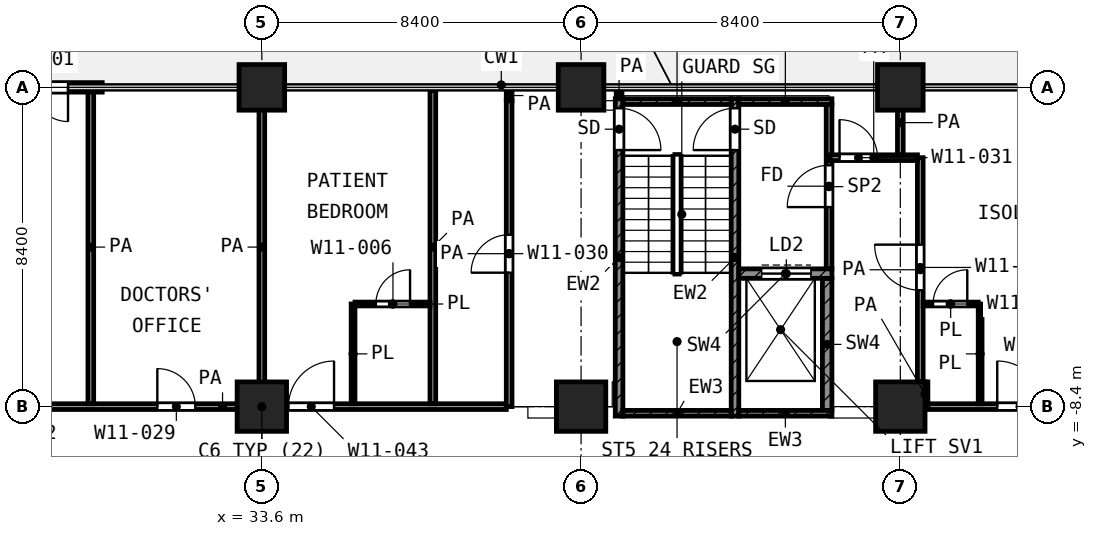
"""IFC4 building model, lengths in metres.
Left out: names, types, materials, properties, quantities, classifications, styles, units other than length and angle.
Written with IfcOpenShell. Run it as: python <this file> out.ifc"""

import sys

from ifc_helpers import new_model, si_unit, direction, frame, frame_2d, origin, origin_2d, place, context, subcontext, project, spatial, rectangle, extrude, element, fill, save


model = new_model("IFC4")
c1 = context("Model", 3, precision=1e-05, world=origin(), true_north=direction((0.0, 1.0)))
c2 = subcontext(c1, "Body", "Model", "MODEL_VIEW")
j1 = project(units=[si_unit("LENGTHUNIT", "METRE"), si_unit("PLANEANGLEUNIT", "RADIAN")], contexts=[c1])
p1 = place(None, origin())
s1 = spatial("IfcSite", under=j1, at=p1, CompositionType="ELEMENT")
p2 = place(p1, origin())
s2 = spatial("IfcBuilding", under=s1, at=p2, CompositionType="ELEMENT")
p3 = place(p2, frame((0.0, 0.0, 72.8)))
s3 = spatial("IfcBuildingStorey", under=s2, at=p3, CompositionType="ELEMENT", Elevation=72.8)
for number, where, z_axis, x_axis in (
    (1, (33.6, 0.0, 0.0), (0.0, 0.0, 1.0), (1.0, 0.0, 0.0)),
    (2, (42.0, 0.0, 0.0), (0.0, 0.0, 1.0), (1.0, 0.0, 0.0)),
    (3, (50.4, 0.0, 0.0), (0.0, 0.0, 1.0), (1.0, 0.0, 0.0)),
):
    element("IfcColumn", number, at=place(p3, frame(where, z_axis=z_axis, x_axis=x_axis)), inside=s3, PredefinedType="COLUMN", context=c2, shape_type="SweptSolid", body=[
        extrude(rectangle(XDim=1.2, YDim=1.2, at=origin_2d()), origin(), (0.0, 0.0, 1.0), 4.2),
    ])
for number, where, z_axis, x_axis in (
    (4, (33.6, -8.4, 0.0), (0.0, 0.0, 1.0), (1.0, 0.0, 0.0)),
    (5, (42.0, -8.4, 0.0), (0.0, 0.0, 1.0), (1.0, 0.0, 0.0)),
    (6, (50.4, -8.4, 0.0), (0.0, 0.0, 1.0), (1.0, 0.0, 0.0)),
):
    element("IfcColumn", number, at=place(p3, frame(where, z_axis=z_axis, x_axis=x_axis)), inside=s3, PredefinedType="COLUMN", context=c2, shape_type="SweptSolid", body=[
        extrude(rectangle(XDim=1.3, YDim=1.3, at=origin_2d()), origin(), (0.0, 0.0, 1.0), 4.2),
    ])
p4 = place(p3, frame((29.4, 0.0, 0.0), z_axis=(0.0, 0.0, 1.0), x_axis=(-1.0, 0.0, 0.0)))
e7 = element("IfcWall", 7, at=p4, inside=s3, PredefinedType="SOLIDWALL", context=c2, shape_type="SweptSolid", body=[
    extrude(rectangle(XDim=3.6, YDim=0.25, at=frame_2d((1.8, 0.0))), origin(), (0.0, 0.0, 1.0), 3.78),
])
p5 = place(p4, frame((0.9, 0.0, 0.0)))
e8 = element("IfcOpeningElement", 8, at=p5, cuts=e7, PredefinedType="OPENING", context=c2, shape_type="SweptSolid", body=[
    extrude(rectangle(XDim=1.8, YDim=2.1, at=frame_2d((0.9, 1.05))), frame((0.0, 0.135, 0.0), z_axis=(0.0, -1.0, 0.0), x_axis=(1.0, 0.0, 0.0)), (0.0, 0.0, 1.0), 0.27),
])
p6 = place(p3, frame((43.0, -8.65, 0.0), z_axis=(0.0, 0.0, 1.0), x_axis=(0.0, 1.0, 0.0)))
e9 = element("IfcWall", 9, at=p6, inside=s3, PredefinedType="SHEAR", context=c2, shape_type="SweptSolid", body=[
    extrude(rectangle(XDim=8.35, YDim=0.2, at=frame_2d((4.175, 0.0))), origin(), (0.0, 0.0, 1.0), 3.9),
])
p7 = place(p6, frame((7.0, 0.0, 0.0)))
e10 = element("IfcOpeningElement", 10, at=p7, cuts=e9, PredefinedType="OPENING", context=c2, shape_type="SweptSolid", body=[
    extrude(rectangle(XDim=1.1, YDim=2.1, at=frame_2d((0.55, 1.05))), frame((0.0, 0.11, 0.0), z_axis=(0.0, -1.0, 0.0), x_axis=(1.0, 0.0, 0.0)), (0.0, 0.0, 1.0), 0.22),
])
p8 = place(p3, frame((46.05, -8.65, 0.0), z_axis=(0.0, 0.0, 1.0), x_axis=(0.0, 1.0, 0.0)))
e11 = element("IfcWall", 11, at=p8, inside=s3, PredefinedType="SHEAR", context=c2, shape_type="SweptSolid", body=[
    extrude(rectangle(XDim=8.35, YDim=0.2, at=frame_2d((4.175, 0.0))), origin(), (0.0, 0.0, 1.0), 3.9),
])
p9 = place(p8, frame((7.0, 0.0, 0.0)))
e12 = element("IfcOpeningElement", 12, at=p9, cuts=e11, PredefinedType="OPENING", context=c2, shape_type="SweptSolid", body=[
    extrude(rectangle(XDim=1.1, YDim=2.1, at=frame_2d((0.55, 1.05))), frame((0.0, 0.11, 0.0), z_axis=(0.0, -1.0, 0.0), x_axis=(1.0, 0.0, 0.0)), (0.0, 0.0, 1.0), 0.22),
])
p10 = place(p3, frame((43.1, -0.375, 0.0), z_axis=(0.0, 0.0, 1.0), x_axis=(1.0, 0.0, 0.0)))
e13 = element("IfcWall", 13, at=p10, inside=s3, PredefinedType="SHEAR", context=c2, shape_type="SweptSolid", body=[
    extrude(rectangle(XDim=2.85, YDim=0.15, at=frame_2d((1.425, 0.0))), origin(), (0.0, 0.0, 1.0), 3.9),
])
p11 = place(p3, frame((46.15, -0.375, 0.0), z_axis=(0.0, 0.0, 1.0), x_axis=(1.0, 0.0, 0.0)))
e14 = element("IfcWall", 14, at=p11, inside=s3, PredefinedType="SHEAR", context=c2, shape_type="SweptSolid", body=[
    extrude(rectangle(XDim=2.45, YDim=0.15, at=frame_2d((1.225, 0.0))), origin(), (0.0, 0.0, 1.0), 3.9),
])
p12 = place(p3, frame((43.1, -8.575, 0.0), z_axis=(0.0, 0.0, 1.0), x_axis=(1.0, 0.0, 0.0)))
e15 = element("IfcWall", 15, at=p12, inside=s3, PredefinedType="SHEAR", context=c2, shape_type="SweptSolid", body=[
    extrude(rectangle(XDim=2.85, YDim=0.15, at=frame_2d((1.425, 0.0))), origin(), (0.0, 0.0, 1.0), 3.9),
])
p13 = place(p3, frame((46.15, -8.575, 0.0), z_axis=(0.0, 0.0, 1.0), x_axis=(1.0, 0.0, 0.0)))
e16 = element("IfcWall", 16, at=p13, inside=s3, PredefinedType="SHEAR", context=c2, shape_type="SweptSolid", body=[
    extrude(rectangle(XDim=2.45, YDim=0.15, at=frame_2d((1.225, 0.0))), origin(), (0.0, 0.0, 1.0), 3.9),
])
p14 = place(p3, frame((46.15, -4.9, 0.0), z_axis=(0.0, 0.0, 1.0), x_axis=(1.0, 0.0, 0.0)))
e17 = element("IfcWall", 17, at=p14, inside=s3, PredefinedType="SHEAR", context=c2, shape_type="SweptSolid", body=[
    extrude(rectangle(XDim=2.45, YDim=0.25, at=frame_2d((1.225, 0.0))), origin(), (0.0, 0.0, 1.0), 3.9),
])
p15 = place(p14, frame((0.6, 0.0, 0.0)))
e18 = element("IfcOpeningElement", 18, at=p15, cuts=e17, PredefinedType="OPENING", context=c2, shape_type="SweptSolid", body=[
    extrude(rectangle(XDim=1.3, YDim=2.1, at=frame_2d((0.65, 1.05))), frame((0.0, 0.135, 0.0), z_axis=(0.0, -1.0, 0.0), x_axis=(1.0, 0.0, 0.0)), (0.0, 0.0, 1.0), 0.27),
])
p16 = place(p3, frame((48.475, -8.5, 0.0), z_axis=(0.0, 0.0, 1.0), x_axis=(0.0, 1.0, 0.0)))
e19 = element("IfcWall", 19, at=p16, inside=s3, PredefinedType="SHEAR", context=c2, shape_type="SweptSolid", body=[
    extrude(rectangle(XDim=3.475, YDim=0.25, at=frame_2d((1.738, 0.0))), origin(), (0.0, 0.0, 1.0), 3.9),
])
p17 = place(p3, frame((48.525, -4.775, 0.0), z_axis=(0.0, 0.0, 1.0), x_axis=(0.0, 1.0, 0.0)))
e20 = element("IfcWall", 20, at=p17, inside=s3, PredefinedType="PARTITIONING", context=c2, shape_type="SweptSolid", body=[
    extrude(rectangle(XDim=4.325, YDim=0.15, at=frame_2d((2.163, 0.0))), origin(), (0.0, 0.0, 1.0), 3.9),
])
p18 = place(p17, frame((1.625, 0.0, 0.0)))
e21 = element("IfcOpeningElement", 21, at=p18, cuts=e20, PredefinedType="OPENING", context=c2, shape_type="SweptSolid", body=[
    extrude(rectangle(XDim=1.1, YDim=2.1, at=frame_2d((0.55, 1.05))), frame((0.0, 0.085, 0.0), z_axis=(0.0, -1.0, 0.0), x_axis=(1.0, 0.0, 0.0)), (0.0, 0.0, 1.0), 0.17),
])
p19 = place(p3, frame((36.05, -5.7, 0.0), z_axis=(0.0, 0.0, 1.0), x_axis=(1.0, 0.0, 0.0)))
e22 = element("IfcWall", 22, at=p19, inside=s3, PredefinedType="PARTITIONING", context=c2, shape_type="SweptSolid", body=[
    extrude(rectangle(XDim=1.975, YDim=0.1, at=frame_2d((0.987, 0.0))), origin(), (0.0, 0.0, 1.0), 3.9),
])
p20 = place(p19, frame((0.55, 0.0, 0.0)))
e23 = element("IfcOpeningElement", 23, at=p20, cuts=e22, PredefinedType="OPENING", context=c2, shape_type="SweptSolid", body=[
    extrude(rectangle(XDim=0.9, YDim=2.1, at=frame_2d((0.45, 1.05))), frame((0.0, 0.06, 0.0), z_axis=(0.0, -1.0, 0.0), x_axis=(1.0, 0.0, 0.0)), (0.0, 0.0, 1.0), 0.12),
])
p21 = place(p3, frame((51.0, -5.7, 0.0), z_axis=(0.0, 0.0, 1.0), x_axis=(1.0, 0.0, 0.0)))
e24 = element("IfcWall", 24, at=p21, inside=s3, PredefinedType="PARTITIONING", context=c2, shape_type="SweptSolid", body=[
    extrude(rectangle(XDim=1.45, YDim=0.1, at=frame_2d((0.725, 0.0))), origin(), (0.0, 0.0, 1.0), 3.9),
])
p22 = place(p21, frame((0.262, 0.0, 0.0)))
e25 = element("IfcOpeningElement", 25, at=p22, cuts=e24, PredefinedType="OPENING", context=c2, shape_type="SweptSolid", body=[
    extrude(rectangle(XDim=0.9, YDim=2.1, at=frame_2d((0.45, 1.05))), frame((0.0, 0.06, 0.0), z_axis=(0.0, -1.0, 0.0), x_axis=(1.0, 0.0, 0.0)), (0.0, 0.0, 1.0), 0.12),
])
for number, where, z_axis, x_axis in (
    (26, (36.0, -8.325, 0.0), (0.0, 0.0, 1.0), (0.0, 1.0, 0.0)),
    (27, (52.5, -8.325, 0.0), (0.0, 0.0, 1.0), (0.0, 1.0, 0.0)),
):
    element("IfcWall", number, at=place(p3, frame(where, z_axis=z_axis, x_axis=x_axis)), inside=s3, PredefinedType="PARTITIONING", context=c2, shape_type="SweptSolid", body=[
        extrude(rectangle(XDim=2.625, YDim=0.1, at=frame_2d((1.312, 0.0))), origin(), (0.0, 0.0, 1.0), 3.9),
    ])
p23 = place(p3, frame((25.1, -8.4, 0.0), z_axis=(0.0, 0.0, 1.0), x_axis=(1.0, 0.0, 0.0)))
e28 = element("IfcWall", 28, at=p23, inside=s3, PredefinedType="PARTITIONING", context=c2, shape_type="SweptSolid", body=[
    extrude(rectangle(XDim=14.932, YDim=0.15, at=frame_2d((7.466, 0.0))), origin(), (0.0, 0.0, 1.0), 3.9),
])
p24 = place(p23, frame((1.45, 0.0, 0.0)))
e29 = element("IfcOpeningElement", 29, at=p24, cuts=e28, PredefinedType="OPENING", context=c2, shape_type="SweptSolid", body=[
    extrude(rectangle(XDim=1.2, YDim=2.1, at=frame_2d((0.6, 1.05))), frame((0.0, 0.085, 0.0), z_axis=(0.0, -1.0, 0.0), x_axis=(1.0, 0.0, 0.0)), (0.0, 0.0, 1.0), 0.17),
])
p25 = place(p23, frame((5.75, 0.0, 0.0)))
e30 = element("IfcOpeningElement", 30, at=p25, cuts=e28, PredefinedType="OPENING", context=c2, shape_type="SweptSolid", body=[
    extrude(rectangle(XDim=1.0, YDim=2.1, at=frame_2d((0.5, 1.05))), frame((0.0, 0.085, 0.0), z_axis=(0.0, -1.0, 0.0), x_axis=(1.0, 0.0, 0.0)), (0.0, 0.0, 1.0), 0.17),
])
p26 = place(p23, frame((9.2, 0.0, 0.0)))
e31 = element("IfcOpeningElement", 31, at=p26, cuts=e28, PredefinedType="OPENING", context=c2, shape_type="SweptSolid", body=[
    extrude(rectangle(XDim=1.2, YDim=2.1, at=frame_2d((0.6, 1.05))), frame((0.0, 0.085, 0.0), z_axis=(0.0, -1.0, 0.0), x_axis=(1.0, 0.0, 0.0)), (0.0, 0.0, 1.0), 0.17),
])
p27 = place(p3, frame((51.125, -8.4, 0.0), z_axis=(0.0, 0.0, 1.0), x_axis=(1.0, 0.0, 0.0)))
e32 = element("IfcWall", 32, at=p27, inside=s3, PredefinedType="PARTITIONING", context=c2, shape_type="SweptSolid", body=[
    extrude(rectangle(XDim=28.595, YDim=0.15, at=frame_2d((14.297, 0.0))), origin(), (0.0, 0.0, 1.0), 3.9),
])
p28 = place(p27, frame((1.825, 0.0, 0.0)))
e33 = element("IfcOpeningElement", 33, at=p28, cuts=e32, PredefinedType="OPENING", context=c2, shape_type="SweptSolid", body=[
    extrude(rectangle(XDim=1.2, YDim=2.1, at=frame_2d((0.6, 1.05))), frame((0.0, 0.085, 0.0), z_axis=(0.0, -1.0, 0.0), x_axis=(1.0, 0.0, 0.0)), (0.0, 0.0, 1.0), 0.17),
])
p29 = place(p27, frame((3.375, 0.0, 0.0)))
e34 = element("IfcOpeningElement", 34, at=p29, cuts=e32, PredefinedType="OPENING", context=c2, shape_type="SweptSolid", body=[
    extrude(rectangle(XDim=1.2, YDim=2.1, at=frame_2d((0.6, 1.05))), frame((0.0, 0.085, 0.0), z_axis=(0.0, -1.0, 0.0), x_axis=(1.0, 0.0, 0.0)), (0.0, 0.0, 1.0), 0.17),
])
p30 = place(p27, frame((5.775, 0.0, 0.0)))
e35 = element("IfcOpeningElement", 35, at=p30, cuts=e32, PredefinedType="OPENING", context=c2, shape_type="SweptSolid", body=[
    extrude(rectangle(XDim=1.2, YDim=2.1, at=frame_2d((0.6, 1.05))), frame((0.0, 0.085, 0.0), z_axis=(0.0, -1.0, 0.0), x_axis=(1.0, 0.0, 0.0)), (0.0, 0.0, 1.0), 0.17),
])
p31 = place(p27, frame((8.375, 0.0, 0.0)))
e36 = element("IfcOpeningElement", 36, at=p31, cuts=e32, PredefinedType="OPENING", context=c2, shape_type="SweptSolid", body=[
    extrude(rectangle(XDim=1.2, YDim=2.1, at=frame_2d((0.6, 1.05))), frame((0.0, 0.085, 0.0), z_axis=(0.0, -1.0, 0.0), x_axis=(1.0, 0.0, 0.0)), (0.0, 0.0, 1.0), 0.17),
])
p32 = place(p27, frame((13.675, 0.0, 0.0)))
e37 = element("IfcOpeningElement", 37, at=p32, cuts=e32, PredefinedType="OPENING", context=c2, shape_type="SweptSolid", body=[
    extrude(rectangle(XDim=1.2, YDim=2.1, at=frame_2d((0.6, 1.05))), frame((0.0, 0.085, 0.0), z_axis=(0.0, -1.0, 0.0), x_axis=(1.0, 0.0, 0.0)), (0.0, 0.0, 1.0), 0.17),
])
p33 = place(p27, frame((16.775, 0.0, 0.0)))
e38 = element("IfcOpeningElement", 38, at=p33, cuts=e32, PredefinedType="OPENING", context=c2, shape_type="SweptSolid", body=[
    extrude(rectangle(XDim=0.9, YDim=2.1, at=frame_2d((0.45, 1.05))), frame((0.0, 0.085, 0.0), z_axis=(0.0, -1.0, 0.0), x_axis=(1.0, 0.0, 0.0)), (0.0, 0.0, 1.0), 0.17),
])
p34 = place(p27, frame((22.275, 0.0, 0.0)))
e39 = element("IfcOpeningElement", 39, at=p34, cuts=e32, PredefinedType="OPENING", context=c2, shape_type="SweptSolid", body=[
    extrude(rectangle(XDim=1.5, YDim=2.1, at=frame_2d((0.75, 1.05))), frame((0.0, 0.085, 0.0), z_axis=(0.0, -1.0, 0.0), x_axis=(1.0, 0.0, 0.0)), (0.0, 0.0, 1.0), 0.17),
])
p35 = place(p3, frame((48.55, -1.85, 0.0), z_axis=(0.0, 0.0, 1.0), x_axis=(1.0, 0.0, 0.0)))
e40 = element("IfcWall", 40, at=p35, inside=s3, PredefinedType="PARTITIONING", context=c2, shape_type="SweptSolid", body=[
    extrude(rectangle(XDim=2.3, YDim=0.15, at=frame_2d((1.15, 0.0))), origin(), (0.0, 0.0, 1.0), 3.9),
])
p36 = place(p35, frame((0.25, 0.0, 0.0)))
e41 = element("IfcOpeningElement", 41, at=p36, cuts=e40, PredefinedType="OPENING", context=c2, shape_type="SweptSolid", body=[
    extrude(rectangle(XDim=1.0, YDim=2.1, at=frame_2d((0.5, 1.05))), frame((0.0, 0.085, 0.0), z_axis=(0.0, -1.0, 0.0), x_axis=(1.0, 0.0, 0.0)), (0.0, 0.0, 1.0), 0.17),
])
for number, where, z_axis, x_axis in (
    (42, (29.1, -8.325, 0.0), (0.0, 0.0, 1.0), (0.0, 1.0, 0.0)),
    (43, (33.6, -8.325, 0.0), (0.0, 0.0, 1.0), (0.0, 1.0, 0.0)),
    (44, (38.1, -8.325, 0.0), (0.0, 0.0, 1.0), (0.0, 1.0, 0.0)),
):
    element("IfcWall", number, at=place(p3, frame(where, z_axis=z_axis, x_axis=x_axis)), inside=s3, PredefinedType="PARTITIONING", context=c2, shape_type="SweptSolid", body=[
        extrude(rectangle(XDim=8.245, YDim=0.15, at=frame_2d((4.123, 0.0))), origin(), (0.0, 0.0, 1.0), 3.9),
    ])
p37 = place(p3, frame((40.107, -8.4, 0.0), z_axis=(0.0, 0.0, 1.0), x_axis=(0.0, 1.0, 0.0)))
e45 = element("IfcWall", 45, at=p37, inside=s3, PredefinedType="PARTITIONING", context=c2, shape_type="SweptSolid", body=[
    extrude(rectangle(XDim=8.048, YDim=0.15, at=frame_2d((4.024, 0.0))), origin(), (0.0, 0.0, 1.0), 3.9),
])
p38 = place(p37, frame((3.524, 0.0, 0.0)))
e46 = element("IfcOpeningElement", 46, at=p38, cuts=e45, PredefinedType="OPENING", context=c2, shape_type="SweptSolid", body=[
    extrude(rectangle(XDim=1.0, YDim=2.1, at=frame_2d((0.5, 1.05))), frame((0.0, 0.085, 0.0), z_axis=(0.0, -1.0, 0.0), x_axis=(1.0, 0.0, 0.0)), (0.0, 0.0, 1.0), 0.17),
])
p39 = place(p3, frame((40.107, -0.35, 0.0), z_axis=(0.0, 0.0, 1.0), x_axis=(0.0, 1.0, 0.0)))
e47 = element("IfcWall", 47, at=p39, inside=s3, PredefinedType="PARTITIONING", context=c2, shape_type="SweptSolid", body=[
    extrude(rectangle(XDim=0.27, YDim=0.15, at=frame_2d((0.135, 0.0))), origin(), (0.0, 0.0, 1.0), 3.9),
])
p40 = place(p3, frame((43.0, -0.27, 0.0), z_axis=(0.0, 0.0, 1.0), x_axis=(0.0, 1.0, 0.0)))
e48 = element("IfcWall", 48, at=p40, inside=s3, PredefinedType="PARTITIONING", context=c2, shape_type="SweptSolid", body=[
    extrude(rectangle(XDim=0.19, YDim=0.15, at=frame_2d((0.095, 0.0))), origin(), (0.0, 0.0, 1.0), 3.9),
])
p41 = place(p3, frame((50.4, -1.775, 0.0), z_axis=(0.0, 0.0, 1.0), x_axis=(0.0, 1.0, 0.0)))
e49 = element("IfcWall", 49, at=p41, inside=s3, PredefinedType="PARTITIONING", context=c2, shape_type="SweptSolid", body=[
    extrude(rectangle(XDim=1.695, YDim=0.15, at=frame_2d((0.847, 0.0))), origin(), (0.0, 0.0, 1.0), 3.9),
])
p42 = place(p3, frame((50.925, -7.748, 0.0), z_axis=(0.0, 0.0, 1.0), x_axis=(0.0, 1.0, 0.0)))
e50 = element("IfcWall", 50, at=p42, inside=s3, PredefinedType="PARTITIONING", context=c2, shape_type="SweptSolid", body=[
    extrude(rectangle(XDim=5.898, YDim=0.15, at=frame_2d((2.949, 0.0))), origin(), (0.0, 0.0, 1.0), 3.9),
])
p43 = place(p42, frame((2.41, 0.0, 0.0)))
e51 = element("IfcOpeningElement", 51, at=p43, cuts=e50, PredefinedType="OPENING", context=c2, shape_type="SweptSolid", body=[
    extrude(rectangle(XDim=1.2, YDim=2.1, at=frame_2d((0.6, 1.05))), frame((0.0, 0.085, 0.0), z_axis=(0.0, -1.0, 0.0), x_axis=(1.0, 0.0, 0.0)), (0.0, 0.0, 1.0), 0.17),
])
p44 = place(p3, frame((51.05, -8.4, 0.0), z_axis=(0.0, 0.0, 1.0), x_axis=(0.0, 1.0, 0.0)))
e52 = element("IfcWall", 52, at=p44, inside=s3, PredefinedType="PARTITIONING", context=c2, shape_type="SweptSolid", body=[
    extrude(rectangle(XDim=0.65, YDim=0.15, at=frame_2d((0.325, 0.0))), origin(), (0.0, 0.0, 1.0), 3.9),
])
p45 = place(p5, origin())
e53 = element("IfcDoor", 53, at=p45, inside=s3, OperationType="DOUBLE_DOOR_SINGLE_SWING", PredefinedType="DOOR", context=c2, shape_type="SweptSolid", body=[
    extrude(rectangle(XDim=1.8, YDim=2.1, at=frame_2d((0.9, 1.05))), frame((0.0, 0.025, 0.0), z_axis=(0.0, -1.0, 0.0), x_axis=(1.0, 0.0, 0.0)), (0.0, 0.0, 1.0), 0.05),
])
fill(e8, e53)
p46 = place(p7, frame((1.1, 0.0, 0.0), z_axis=(0.0, 0.0, 1.0), x_axis=(-1.0, 0.0, 0.0)))
e54 = element("IfcDoor", 54, at=p46, inside=s3, OperationType="SINGLE_SWING_LEFT", PredefinedType="DOOR", context=c2, shape_type="SweptSolid", body=[
    extrude(rectangle(XDim=1.1, YDim=2.1, at=frame_2d((0.55, 1.05))), frame((0.0, 0.025, 0.0), z_axis=(0.0, -1.0, 0.0), x_axis=(1.0, 0.0, 0.0)), (0.0, 0.0, 1.0), 0.05),
])
fill(e10, e54)
p47 = place(p9, origin())
e55 = element("IfcDoor", 55, at=p47, inside=s3, OperationType="SINGLE_SWING_LEFT", PredefinedType="DOOR", context=c2, shape_type="SweptSolid", body=[
    extrude(rectangle(XDim=1.1, YDim=2.1, at=frame_2d((0.55, 1.05))), frame((0.0, 0.025, 0.0), z_axis=(0.0, -1.0, 0.0), x_axis=(1.0, 0.0, 0.0)), (0.0, 0.0, 1.0), 0.05),
])
fill(e12, e55)
p48 = place(p15, origin())
e56 = element("IfcDoor", 56, at=p48, inside=s3, OperationType="DOUBLE_DOOR_SLIDING", PredefinedType="DOOR", context=c2, shape_type="SweptSolid", body=[
    extrude(rectangle(XDim=1.3, YDim=2.1, at=frame_2d((0.65, 1.05))), frame((0.0, 0.025, 0.0), z_axis=(0.0, -1.0, 0.0), x_axis=(1.0, 0.0, 0.0)), (0.0, 0.0, 1.0), 0.05),
])
fill(e18, e56)
p49 = place(p18, origin())
e57 = element("IfcDoor", 57, at=p49, inside=s3, OperationType="SINGLE_SWING_LEFT", PredefinedType="DOOR", context=c2, shape_type="SweptSolid", body=[
    extrude(rectangle(XDim=1.1, YDim=2.1, at=frame_2d((0.55, 1.05))), frame((0.0, 0.025, 0.0), z_axis=(0.0, -1.0, 0.0), x_axis=(1.0, 0.0, 0.0)), (0.0, 0.0, 1.0), 0.05),
])
fill(e21, e57)
p50 = place(p25, origin())
e58 = element("IfcDoor", 58, at=p50, inside=s3, OperationType="SINGLE_SWING_LEFT", PredefinedType="DOOR", context=c2, shape_type="SweptSolid", body=[
    extrude(rectangle(XDim=1.0, YDim=2.1, at=frame_2d((0.5, 1.05))), frame((0.0, 0.025, 0.0), z_axis=(0.0, -1.0, 0.0), x_axis=(1.0, 0.0, 0.0)), (0.0, 0.0, 1.0), 0.05),
])
fill(e30, e58)
p51 = place(p26, origin())
e59 = element("IfcDoor", 59, at=p51, inside=s3, OperationType="SINGLE_SWING_RIGHT", PredefinedType="DOOR", context=c2, shape_type="SweptSolid", body=[
    extrude(rectangle(XDim=1.2, YDim=2.1, at=frame_2d((0.6, 1.05))), frame((0.0, 0.025, 0.0), z_axis=(0.0, -1.0, 0.0), x_axis=(1.0, 0.0, 0.0)), (0.0, 0.0, 1.0), 0.05),
])
fill(e31, e59)
p52 = place(p20, origin())
e60 = element("IfcDoor", 60, at=p52, inside=s3, OperationType="SINGLE_SWING_RIGHT", PredefinedType="DOOR", context=c2, shape_type="SweptSolid", body=[
    extrude(rectangle(XDim=0.9, YDim=2.1, at=frame_2d((0.45, 1.05))), frame((0.0, 0.025, 0.0), z_axis=(0.0, -1.0, 0.0), x_axis=(1.0, 0.0, 0.0)), (0.0, 0.0, 1.0), 0.05),
])
fill(e23, e60)
p53 = place(p38, origin())
e61 = element("IfcDoor", 61, at=p53, inside=s3, OperationType="SINGLE_SWING_LEFT", PredefinedType="DOOR", context=c2, shape_type="SweptSolid", body=[
    extrude(rectangle(XDim=1.0, YDim=2.1, at=frame_2d((0.5, 1.05))), frame((0.0, 0.025, 0.0), z_axis=(0.0, -1.0, 0.0), x_axis=(1.0, 0.0, 0.0)), (0.0, 0.0, 1.0), 0.05),
])
fill(e46, e61)
p54 = place(p36, origin())
e62 = element("IfcDoor", 62, at=p54, inside=s3, OperationType="SINGLE_SWING_LEFT", PredefinedType="DOOR", context=c2, shape_type="SweptSolid", body=[
    extrude(rectangle(XDim=1.0, YDim=2.1, at=frame_2d((0.5, 1.05))), frame((0.0, 0.025, 0.0), z_axis=(0.0, -1.0, 0.0), x_axis=(1.0, 0.0, 0.0)), (0.0, 0.0, 1.0), 0.05),
])
fill(e41, e62)
p55 = place(p28, origin())
e63 = element("IfcDoor", 63, at=p55, inside=s3, OperationType="SINGLE_SWING_LEFT", PredefinedType="DOOR", context=c2, shape_type="SweptSolid", body=[
    extrude(rectangle(XDim=1.2, YDim=2.1, at=frame_2d((0.6, 1.05))), frame((0.0, 0.025, 0.0), z_axis=(0.0, -1.0, 0.0), x_axis=(1.0, 0.0, 0.0)), (0.0, 0.0, 1.0), 0.05),
])
fill(e33, e63)
p56 = place(p43, origin())
e64 = element("IfcDoor", 64, at=p56, inside=s3, OperationType="SINGLE_SWING_RIGHT", PredefinedType="DOOR", context=c2, shape_type="SweptSolid", body=[
    extrude(rectangle(XDim=1.2, YDim=2.1, at=frame_2d((0.6, 1.05))), frame((0.0, 0.025, 0.0), z_axis=(0.0, -1.0, 0.0), x_axis=(1.0, 0.0, 0.0)), (0.0, 0.0, 1.0), 0.05),
])
fill(e51, e64)
p57 = place(p22, origin())
e65 = element("IfcDoor", 65, at=p57, inside=s3, OperationType="SINGLE_SWING_RIGHT", PredefinedType="DOOR", context=c2, shape_type="SweptSolid", body=[
    extrude(rectangle(XDim=0.9, YDim=2.1, at=frame_2d((0.45, 1.05))), frame((0.0, 0.025, 0.0), z_axis=(0.0, -1.0, 0.0), x_axis=(1.0, 0.0, 0.0)), (0.0, 0.0, 1.0), 0.05),
])
fill(e25, e65)
save(model, sys.argv[1])
